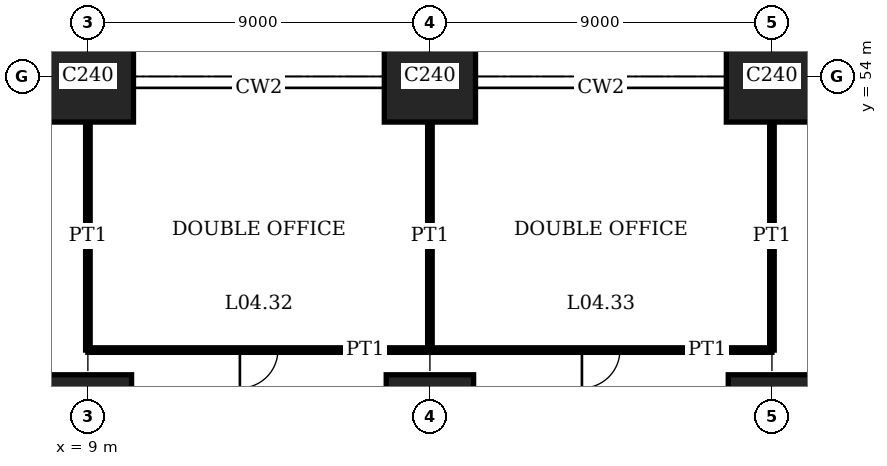
"""IFC4 building model, lengths in metres.
Left out: names, types, materials, properties, quantities, classifications, styles, units other than length and angle.
Written with IfcOpenShell. Run it as: python <this file> out.ifc"""

import sys

from ifc_helpers import new_model, si_unit, direction, frame, frame_2d, origin, origin_2d, place, context, subcontext, project, spatial, rectangle, extrude, element, fill, save


model = new_model("IFC4")
c1 = context("Model", 3, precision=1e-05, world=origin(), true_north=direction((0.0, 1.0)))
c2 = subcontext(c1, "Body", "Model", "MODEL_VIEW")
j1 = project(units=[si_unit("LENGTHUNIT", "METRE"), si_unit("PLANEANGLEUNIT", "RADIAN")], contexts=[c1])
p1 = place(None, origin())
s1 = spatial("IfcSite", under=j1, at=p1, CompositionType="ELEMENT")
p2 = place(p1, origin())
s2 = spatial("IfcBuilding", under=s1, at=p2, CompositionType="ELEMENT")
p3 = place(p2, frame((0.0, 0.0, 19.8)))
s3 = spatial("IfcBuildingStorey", under=s2, at=p3, CompositionType="ELEMENT", Elevation=19.8)
p4 = place(p3, frame((9.0, 45.0, 0.0), z_axis=(0.0, 0.0, 1.0), x_axis=(1.0, 0.0, 0.0)))
e1 = element("IfcColumn", 1, at=p4, inside=s3, PredefinedType="COLUMN", context=c2, shape_type="SweptSolid", body=[
    extrude(rectangle(XDim=2.3, YDim=2.3, at=origin_2d()), origin(), (0.0, 0.0, 1.0), 4.0),
])
p5 = place(p3, frame((9.0, 54.0, 0.0), z_axis=(0.0, 0.0, 1.0), x_axis=(1.0, 0.0, 0.0)))
e2 = element("IfcColumn", 2, at=p5, inside=s3, PredefinedType="COLUMN", context=c2, shape_type="SweptSolid", body=[
    extrude(rectangle(XDim=2.4, YDim=2.4, at=origin_2d()), origin(), (0.0, 0.0, 1.0), 4.0),
])
p6 = place(p3, frame((18.0, 45.0, 0.0), z_axis=(0.0, 0.0, 1.0), x_axis=(1.0, 0.0, 0.0)))
e3 = element("IfcColumn", 3, at=p6, inside=s3, PredefinedType="COLUMN", context=c2, shape_type="SweptSolid", body=[
    extrude(rectangle(XDim=2.3, YDim=2.3, at=origin_2d()), origin(), (0.0, 0.0, 1.0), 4.0),
])
p7 = place(p3, frame((18.0, 54.0, 0.0), z_axis=(0.0, 0.0, 1.0), x_axis=(1.0, 0.0, 0.0)))
e4 = element("IfcColumn", 4, at=p7, inside=s3, PredefinedType="COLUMN", context=c2, shape_type="SweptSolid", body=[
    extrude(rectangle(XDim=2.4, YDim=2.4, at=origin_2d()), origin(), (0.0, 0.0, 1.0), 4.0),
])
p8 = place(p3, frame((27.0, 45.0, 0.0), z_axis=(0.0, 0.0, 1.0), x_axis=(1.0, 0.0, 0.0)))
e5 = element("IfcColumn", 5, at=p8, inside=s3, PredefinedType="COLUMN", context=c2, shape_type="SweptSolid", body=[
    extrude(rectangle(XDim=2.3, YDim=2.3, at=origin_2d()), origin(), (0.0, 0.0, 1.0), 4.0),
])
p9 = place(p3, frame((27.0, 54.0, 0.0), z_axis=(0.0, 0.0, 1.0), x_axis=(1.0, 0.0, 0.0)))
e6 = element("IfcColumn", 6, at=p9, inside=s3, PredefinedType="COLUMN", context=c2, shape_type="SweptSolid", body=[
    extrude(rectangle(XDim=2.4, YDim=2.4, at=origin_2d()), origin(), (0.0, 0.0, 1.0), 4.0),
])
p10 = place(p3, frame((9.0, 46.8, 0.0), z_axis=(0.0, 0.0, 1.0), x_axis=(1.0, 0.0, 0.0)))
e7 = element("IfcWall", 7, at=p10, inside=s3, PredefinedType="PARTITIONING", context=c2, shape_type="SweptSolid", body=[
    extrude(rectangle(XDim=9.0, YDim=0.12, at=frame_2d((4.5, 0.0))), origin(), (0.0, 0.0, 1.0), 3.75),
])
p11 = place(p10, frame((4.0, 0.0, 0.0)))
e8 = element("IfcOpeningElement", 8, at=p11, cuts=e7, PredefinedType="OPENING", context=c2, shape_type="SweptSolid", body=[
    extrude(rectangle(XDim=1.0, YDim=2.4, at=frame_2d((0.5, 1.2))), frame((0.0, 0.07, 0.0), z_axis=(0.0, -1.0, 0.0), x_axis=(1.0, 0.0, 0.0)), (0.0, 0.0, 1.0), 0.14),
])
p12 = place(p3, frame((18.0, 46.8, 0.0), z_axis=(0.0, 0.0, 1.0), x_axis=(1.0, 0.0, 0.0)))
e9 = element("IfcWall", 9, at=p12, inside=s3, PredefinedType="PARTITIONING", context=c2, shape_type="SweptSolid", body=[
    extrude(rectangle(XDim=9.0, YDim=0.12, at=frame_2d((4.5, 0.0))), origin(), (0.0, 0.0, 1.0), 3.75),
])
p13 = place(p12, frame((4.0, 0.0, 0.0)))
e10 = element("IfcOpeningElement", 10, at=p13, cuts=e9, PredefinedType="OPENING", context=c2, shape_type="SweptSolid", body=[
    extrude(rectangle(XDim=1.0, YDim=2.4, at=frame_2d((0.5, 1.2))), frame((0.0, 0.07, 0.0), z_axis=(0.0, -1.0, 0.0), x_axis=(1.0, 0.0, 0.0)), (0.0, 0.0, 1.0), 0.14),
])
for number, where, z_axis, x_axis in (
    (11, (9.0, 46.8, 0.0), (0.0, 0.0, 1.0), (0.0, 1.0, 0.0)),
    (12, (18.0, 46.8, 0.0), (0.0, 0.0, 1.0), (0.0, 1.0, 0.0)),
    (13, (27.0, 46.8, 0.0), (0.0, 0.0, 1.0), (0.0, 1.0, 0.0)),
):
    element("IfcWall", number, at=place(p3, frame(where, z_axis=z_axis, x_axis=x_axis)), inside=s3, PredefinedType="PARTITIONING", context=c2, shape_type="SweptSolid", body=[
        extrude(rectangle(XDim=6.0, YDim=0.12, at=frame_2d((3.0, 0.0))), origin(), (0.0, 0.0, 1.0), 3.05),
    ])
p14 = place(p11, origin())
e14 = element("IfcDoor", 14, at=p14, inside=s3, OperationType="SINGLE_SWING_LEFT", PredefinedType="DOOR", context=c2, shape_type="SweptSolid", body=[
    extrude(rectangle(XDim=1.0, YDim=2.4, at=frame_2d((0.5, 1.2))), frame((0.0, 0.025, 0.0), z_axis=(0.0, -1.0, 0.0), x_axis=(1.0, 0.0, 0.0)), (0.0, 0.0, 1.0), 0.05),
])
fill(e8, e14)
p15 = place(p13, origin())
e15 = element("IfcDoor", 15, at=p15, inside=s3, OperationType="SINGLE_SWING_LEFT", PredefinedType="DOOR", context=c2, shape_type="SweptSolid", body=[
    extrude(rectangle(XDim=1.0, YDim=2.4, at=frame_2d((0.5, 1.2))), frame((0.0, 0.025, 0.0), z_axis=(0.0, -1.0, 0.0), x_axis=(1.0, 0.0, 0.0)), (0.0, 0.0, 1.0), 0.05),
])
fill(e10, e15)
save(model, sys.argv[1])
